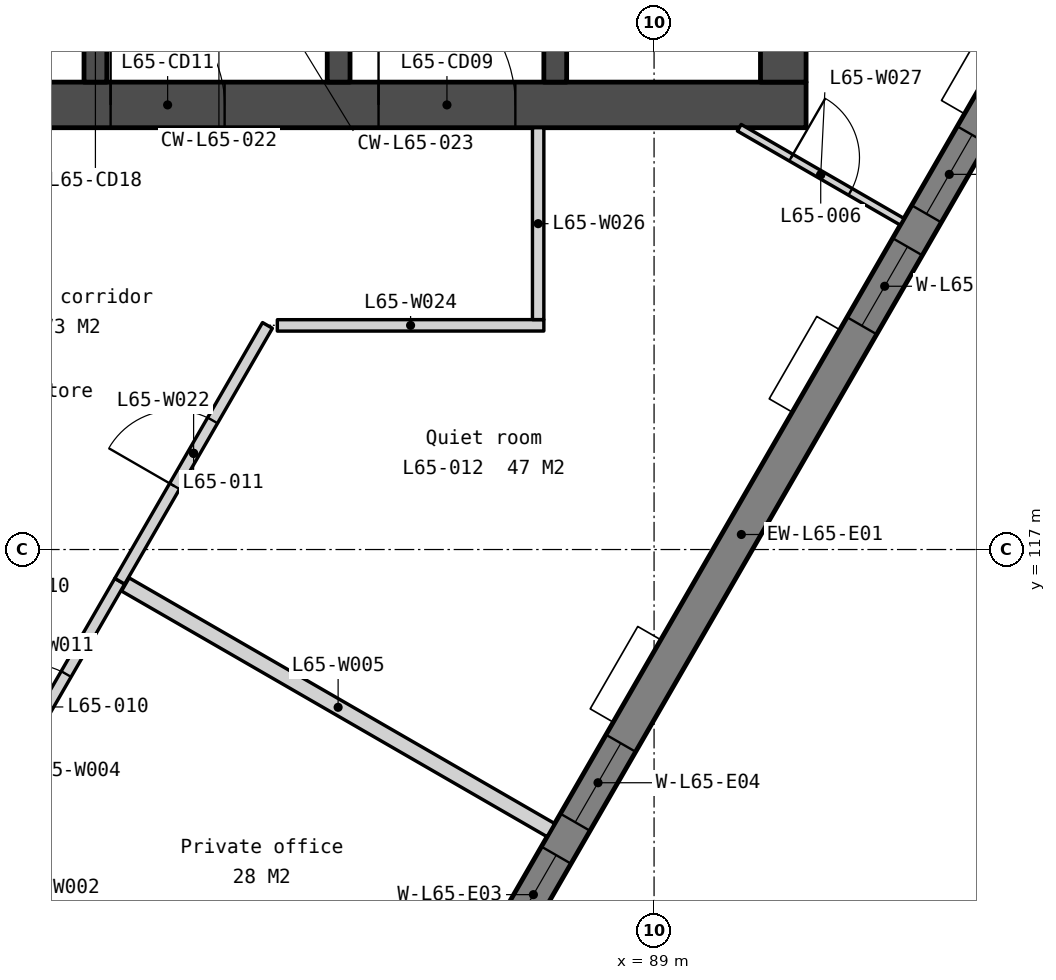
"""IFC4 building model, lengths in metres.
Left out: names, types, materials, properties, quantities, classifications, styles, units other than length and angle.
Written with IfcOpenShell. Run it as: python <this file> out.ifc"""

import sys

from ifc_helpers import new_model, si_unit, direction, frame, frame_2d, origin, place, context, subcontext, project, spatial, polyline, rectangle, outline, extrude, element, fill, save


model = new_model("IFC4")
c1 = context("Model", 3, precision=1e-05, world=origin(), true_north=direction((0.0, 1.0)))
c2 = subcontext(c1, "Body", "Model", "MODEL_VIEW")
j1 = project(units=[si_unit("LENGTHUNIT", "METRE"), si_unit("PLANEANGLEUNIT", "RADIAN")], contexts=[c1])
p1 = place(None, origin())
s1 = spatial("IfcSite", under=j1, at=p1, CompositionType="ELEMENT")
p2 = place(p1, origin())
s2 = spatial("IfcBuilding", under=s1, at=p2, CompositionType="ELEMENT")
p3 = place(p2, frame((0.0, 0.0, 266.0)))
s3 = spatial("IfcBuildingStorey", under=s2, at=p3, CompositionType="ELEMENT", Elevation=266.0)
p4 = place(p3, frame((69.0, 122.85, 0.0), z_axis=(0.0, 0.0, 1.0), x_axis=(1.0, 0.0, 0.0)))
e1 = element("IfcWall", 1, at=p4, inside=s3, PredefinedType="SOLIDWALL", context=c2, shape_type="SweptSolid", body=[
    extrude(rectangle(XDim=22.0, YDim=0.6, at=frame_2d((11.0, 0.0))), origin(), (0.0, 0.0, 1.0), 3.75),
])
p5 = place(p4, frame((16.375, 0.0, 0.0)))
e2 = element("IfcOpeningElement", 2, at=p5, cuts=e1, PredefinedType="OPENING", context=c2, shape_type="SweptSolid", body=[
    extrude(rectangle(XDim=1.8, YDim=2.1, at=frame_2d((0.9, 1.05))), frame((0.0, 0.31, 0.0), z_axis=(0.0, -1.0, 0.0), x_axis=(1.0, 0.0, 0.0)), (0.0, 0.0, 1.0), 0.62),
])
p6 = place(p4, frame((3.825, 0.0, 0.0)))
e3 = element("IfcOpeningElement", 3, at=p6, cuts=e1, PredefinedType="OPENING", context=c2, shape_type="SweptSolid", body=[
    extrude(rectangle(XDim=1.8, YDim=2.1, at=frame_2d((0.9, 1.05))), frame((0.0, 0.31, 0.0), z_axis=(0.0, -1.0, 0.0), x_axis=(1.0, 0.0, 0.0)), (0.0, 0.0, 1.0), 0.62),
])
p7 = place(p4, frame((12.85, 0.0, 0.0)))
e4 = element("IfcOpeningElement", 4, at=p7, cuts=e1, PredefinedType="OPENING", context=c2, shape_type="SweptSolid", body=[
    extrude(rectangle(XDim=1.5, YDim=2.1, at=frame_2d((0.75, 1.05))), frame((0.0, 0.31, 0.0), z_axis=(0.0, -1.0, 0.0), x_axis=(1.0, 0.0, 0.0)), (0.0, 0.0, 1.0), 0.62),
])
p8 = place(p3, frame((81.65, 125.7, 0.0), z_axis=(0.0, 0.0, 1.0), x_axis=(0.0, -1.0, 0.0)))
e5 = element("IfcWall", 5, at=p8, inside=s3, PredefinedType="SOLIDWALL", context=c2, shape_type="SweptSolid", body=[
    extrude(rectangle(XDim=2.55, YDim=0.3, at=frame_2d((1.275, 0.0))), origin(), (0.0, 0.0, 1.0), 3.75),
])
p9 = place(p8, frame((0.75, 0.0, 0.0)))
e6 = element("IfcOpeningElement", 6, at=p9, cuts=e5, PredefinedType="OPENING", context=c2, shape_type="SweptSolid", body=[
    extrude(rectangle(XDim=1.0, YDim=2.1, at=frame_2d((0.5, 1.05))), frame((0.0, 0.16, 0.0), z_axis=(0.0, -1.0, 0.0), x_axis=(1.0, 0.0, 0.0)), (0.0, 0.0, 1.0), 0.32),
])
p10 = place(p3, frame((84.85, 125.85, 0.0), z_axis=(0.0, 0.0, 1.0), x_axis=(0.0, -1.0, 0.0)))
e7 = element("IfcWall", 7, at=p10, inside=s3, PredefinedType="SOLIDWALL", context=c2, shape_type="SweptSolid", body=[
    extrude(rectangle(XDim=2.7, YDim=0.3, at=frame_2d((1.35, 0.0))), origin(), (0.0, 0.0, 1.0), 3.75),
])
p11 = place(p3, frame((87.7, 133.95, 0.0), z_axis=(0.0, 0.0, 1.0), x_axis=(0.0, -1.0, 0.0)))
e8 = element("IfcWall", 8, at=p11, inside=s3, PredefinedType="SOLIDWALL", context=c2, shape_type="SweptSolid", body=[
    extrude(rectangle(XDim=10.8, YDim=0.3, at=frame_2d((5.4, 0.0))), origin(), (0.0, 0.0, 1.0), 3.75),
])
p12 = place(p11, frame((6.95, 0.0, 0.0)))
e9 = element("IfcOpeningElement", 9, at=p12, cuts=e8, PredefinedType="OPENING", context=c2, shape_type="SweptSolid", body=[
    extrude(rectangle(XDim=1.1, YDim=2.1, at=frame_2d((0.55, 1.05))), frame((0.0, 0.16, 0.0), z_axis=(0.0, -1.0, 0.0), x_axis=(1.0, 0.0, 0.0)), (0.0, 0.0, 1.0), 0.32),
])
p13 = place(p11, frame((5.1, 0.0, 0.0)))
e10 = element("IfcOpeningElement", 10, at=p13, cuts=e8, PredefinedType="OPENING", context=c2, shape_type="SweptSolid", body=[
    extrude(rectangle(XDim=1.0, YDim=2.1, at=frame_2d((0.5, 1.05))), frame((0.0, 0.16, 0.0), z_axis=(0.0, -1.0, 0.0), x_axis=(1.0, 0.0, 0.0)), (0.0, 0.0, 1.0), 0.32),
])
p14 = place(p11, frame((9.25, 0.0, 0.0)))
e11 = element("IfcOpeningElement", 11, at=p14, cuts=e8, PredefinedType="OPENING", context=c2, shape_type="SweptSolid", body=[
    extrude(rectangle(XDim=1.1, YDim=2.1, at=frame_2d((0.55, 1.05))), frame((0.0, 0.16, 0.0), z_axis=(0.0, -1.0, 0.0), x_axis=(1.0, 0.0, 0.0)), (0.0, 0.0, 1.0), 0.32),
])
p15 = place(p3, frame((90.7, 133.95, 0.0), z_axis=(0.0, 0.0, 1.0), x_axis=(0.0, -1.0, 0.0)))
e12 = element("IfcWall", 12, at=p15, inside=s3, PredefinedType="SOLIDWALL", context=c2, shape_type="SweptSolid", body=[
    extrude(rectangle(XDim=10.8, YDim=0.6, at=frame_2d((5.4, 0.0))), origin(), (0.0, 0.0, 1.0), 3.75),
])
p16 = place(p3, frame((80.905, 101.188, -0.15), z_axis=(0.0, 0.0, 1.0), x_axis=(0.500002536638, 0.866023939251, 0.0)))
e13 = element("IfcWall", 13, at=p16, inside=s3, PredefinedType="SOLIDWALL", context=c2, shape_type="SweptSolid", body=[
    extrude(outline(polyline([(36.972, 0.0), (36.972, 3.9), (0.0, 3.9), (0.0, 0.0), (36.972, 0.0)])), frame((0.0, 0.225, 0.0), z_axis=(0.0, -1.0, 0.0), x_axis=(1.0, 0.0, 0.0)), (0.0, 0.0, 1.0), 0.45),
])
p17 = place(p16, frame((3.172, 0.0, 0.95)))
e14 = element("IfcOpeningElement", 14, at=p17, cuts=e13, PredefinedType="OPENING", context=c2, shape_type="SweptSolid", body=[
    extrude(rectangle(XDim=1.2, YDim=2.2, at=frame_2d((0.6, 1.1))), frame((0.0, 0.235, 0.0), z_axis=(0.0, -1.0, 0.0), x_axis=(1.0, 0.0, 0.0)), (0.0, 0.0, 1.0), 0.47),
])
p18 = place(p16, frame((4.872, 0.0, 0.95)))
e15 = element("IfcOpeningElement", 15, at=p18, cuts=e13, PredefinedType="OPENING", context=c2, shape_type="SweptSolid", body=[
    extrude(rectangle(XDim=1.2, YDim=2.2, at=frame_2d((0.6, 1.1))), frame((0.0, 0.235, 0.0), z_axis=(0.0, -1.0, 0.0), x_axis=(1.0, 0.0, 0.0)), (0.0, 0.0, 1.0), 0.47),
])
p19 = place(p16, frame((12.415, 0.0, 0.95)))
e16 = element("IfcOpeningElement", 16, at=p19, cuts=e13, PredefinedType="OPENING", context=c2, shape_type="SweptSolid", body=[
    extrude(rectangle(XDim=1.2, YDim=2.2, at=frame_2d((0.6, 1.1))), frame((0.0, 0.235, 0.0), z_axis=(0.0, -1.0, 0.0), x_axis=(1.0, 0.0, 0.0)), (0.0, 0.0, 1.0), 0.47),
])
p20 = place(p16, frame((14.115, 0.0, 0.95)))
e17 = element("IfcOpeningElement", 17, at=p20, cuts=e13, PredefinedType="OPENING", context=c2, shape_type="SweptSolid", body=[
    extrude(rectangle(XDim=1.2, YDim=2.2, at=frame_2d((0.6, 1.1))), frame((0.0, 0.235, 0.0), z_axis=(0.0, -1.0, 0.0), x_axis=(1.0, 0.0, 0.0)), (0.0, 0.0, 1.0), 0.47),
])
p21 = place(p16, frame((21.658, 0.0, 0.95)))
e18 = element("IfcOpeningElement", 18, at=p21, cuts=e13, PredefinedType="OPENING", context=c2, shape_type="SweptSolid", body=[
    extrude(rectangle(XDim=1.2, YDim=2.2, at=frame_2d((0.6, 1.1))), frame((0.0, 0.235, 0.0), z_axis=(0.0, -1.0, 0.0), x_axis=(1.0, 0.0, 0.0)), (0.0, 0.0, 1.0), 0.47),
])
p22 = place(p16, frame((23.358, 0.0, 0.95)))
e19 = element("IfcOpeningElement", 19, at=p22, cuts=e13, PredefinedType="OPENING", context=c2, shape_type="SweptSolid", body=[
    extrude(rectangle(XDim=1.2, YDim=2.2, at=frame_2d((0.6, 1.1))), frame((0.0, 0.235, 0.0), z_axis=(0.0, -1.0, 0.0), x_axis=(1.0, 0.0, 0.0)), (0.0, 0.0, 1.0), 0.47),
])
p23 = place(p16, frame((30.901, 0.0, 0.95)))
e20 = element("IfcOpeningElement", 20, at=p23, cuts=e13, PredefinedType="OPENING", context=c2, shape_type="SweptSolid", body=[
    extrude(rectangle(XDim=1.2, YDim=2.2, at=frame_2d((0.6, 1.1))), frame((0.0, 0.235, 0.0), z_axis=(0.0, -1.0, 0.0), x_axis=(1.0, 0.0, 0.0)), (0.0, 0.0, 1.0), 0.47),
])
p24 = place(p16, frame((32.601, 0.0, 0.95)))
e21 = element("IfcOpeningElement", 21, at=p24, cuts=e13, PredefinedType="OPENING", context=c2, shape_type="SweptSolid", body=[
    extrude(rectangle(XDim=1.2, YDim=2.2, at=frame_2d((0.6, 1.1))), frame((0.0, 0.235, 0.0), z_axis=(0.0, -1.0, 0.0), x_axis=(1.0, 0.0, 0.0)), (0.0, 0.0, 1.0), 0.47),
])
p25 = place(p3, frame((80.0, 112.384, 0.0), z_axis=(0.0, 0.0, 1.0), x_axis=(0.866021154418, -0.500007360046, 0.0)))
e22 = element("IfcWall", 22, at=p25, inside=s3, PredefinedType="PARTITIONING", context=c2, shape_type="SweptSolid", body=[
    extrude(rectangle(XDim=6.157, YDim=0.2, at=frame_2d((3.078, 0.0))), origin(), (0.0, 0.0, 1.0), 3.75),
])
p26 = place(p3, frame((82.044, 116.54, 0.0), z_axis=(0.0, 0.0, 1.0), x_axis=(0.86603151488, -0.499989415123, 0.0)))
e23 = element("IfcWall", 23, at=p26, inside=s3, PredefinedType="PARTITIONING", context=c2, shape_type="SweptSolid", body=[
    extrude(rectangle(XDim=6.465, YDim=0.2, at=frame_2d((3.232, 0.0))), origin(), (0.0, 0.0, 1.0), 3.75),
])
p27 = place(p3, frame((80.06, 113.274, 0.0), z_axis=(0.0, 0.0, 1.0), x_axis=(0.499987977232, 0.866032345022, 0.0)))
e24 = element("IfcWall", 24, at=p27, inside=s3, PredefinedType="PARTITIONING", context=c2, shape_type="SweptSolid", body=[
    extrude(rectangle(XDim=3.82, YDim=0.15, at=frame_2d((1.91, 0.0))), origin(), (0.0, 0.0, 1.0), 3.75),
])
p28 = place(p27, frame((1.41, 0.0, 0.0)))
e25 = element("IfcOpeningElement", 25, at=p28, cuts=e24, PredefinedType="OPENING", context=c2, shape_type="SweptSolid", body=[
    extrude(rectangle(XDim=1.0, YDim=2.1, at=frame_2d((0.5, 1.05))), frame((0.0, 0.085, 0.0), z_axis=(0.0, -1.0, 0.0), x_axis=(1.0, 0.0, 0.0)), (0.0, 0.0, 1.0), 0.17),
])
p29 = place(p3, frame((81.97, 116.583, 0.0), z_axis=(0.0, 0.0, 1.0), x_axis=(0.500003384379, 0.866023449803, 0.0)))
e26 = element("IfcWall", 26, at=p29, inside=s3, PredefinedType="PARTITIONING", context=c2, shape_type="SweptSolid", body=[
    extrude(rectangle(XDim=3.887, YDim=0.15, at=frame_2d((1.943, 0.0))), origin(), (0.0, 0.0, 1.0), 3.75),
])
p30 = place(p29, frame((1.443, 0.0, 0.0)))
e27 = element("IfcOpeningElement", 27, at=p30, cuts=e26, PredefinedType="OPENING", context=c2, shape_type="SweptSolid", body=[
    extrude(rectangle(XDim=1.0, YDim=2.1, at=frame_2d((0.5, 1.05))), frame((0.0, 0.085, 0.0), z_axis=(0.0, -1.0, 0.0), x_axis=(1.0, 0.0, 0.0)), (0.0, 0.0, 1.0), 0.17),
])
p31 = place(p3, frame((84.043, 119.949, 0.0), z_axis=(0.0, 0.0, 1.0), x_axis=(0.999999961215, 0.000278512731, 0.0)))
e28 = element("IfcWall", 28, at=p31, inside=s3, PredefinedType="PARTITIONING", context=c2, shape_type="SweptSolid", body=[
    extrude(rectangle(XDim=3.506, YDim=0.15, at=frame_2d((1.753, 0.0))), origin(), (0.0, 0.0, 1.0), 3.75),
])
p32 = place(p3, frame((87.475, 120.025, 0.0), z_axis=(0.0, 0.0, 1.0), x_axis=(9.6693096e-05, 0.999999995325, 0.0)))
e29 = element("IfcWall", 29, at=p32, inside=s3, PredefinedType="PARTITIONING", context=c2, shape_type="SweptSolid", body=[
    extrude(rectangle(XDim=2.525, YDim=0.15, at=frame_2d((1.262, 0.0))), origin(), (0.0, 0.0, 1.0), 3.75),
])
p33 = place(p3, frame((90.121, 122.55, 0.0), z_axis=(0.0, 0.0, 1.0), x_axis=(0.86604923931, -0.499958713387, 0.0)))
e30 = element("IfcWall", 30, at=p33, inside=s3, PredefinedType="PARTITIONING", context=c2, shape_type="SweptSolid", body=[
    extrude(rectangle(XDim=2.475, YDim=0.1, at=frame_2d((1.237, 0.0))), origin(), (0.0, 0.0, 1.0), 3.75),
])
p34 = place(p33, frame((0.787, 0.0, 0.0)))
e31 = element("IfcOpeningElement", 31, at=p34, cuts=e30, PredefinedType="OPENING", context=c2, shape_type="SweptSolid", body=[
    extrude(rectangle(XDim=0.9, YDim=2.1, at=frame_2d((0.45, 1.05))), frame((0.0, 0.06, 0.0), z_axis=(0.0, -1.0, 0.0), x_axis=(1.0, 0.0, 0.0)), (0.0, 0.0, 1.0), 0.12),
])
p35 = place(p5, origin())
e32 = element("IfcDoor", 32, at=p35, inside=s3, OperationType="DOUBLE_DOOR_DOUBLE_SWING", PredefinedType="DOOR", context=c2, shape_type="SweptSolid", body=[
    extrude(rectangle(XDim=1.8, YDim=2.1, at=frame_2d((0.9, 1.05))), frame((0.0, 0.025, 0.0), z_axis=(0.0, -1.0, 0.0), x_axis=(1.0, 0.0, 0.0)), (0.0, 0.0, 1.0), 0.05),
])
fill(e2, e32)
p36 = place(p7, origin())
e33 = element("IfcDoor", 33, at=p36, inside=s3, OperationType="DOUBLE_DOOR_DOUBLE_SWING", PredefinedType="DOOR", context=c2, shape_type="SweptSolid", body=[
    extrude(rectangle(XDim=1.5, YDim=2.1, at=frame_2d((0.75, 1.05))), frame((0.0, 0.025, 0.0), z_axis=(0.0, -1.0, 0.0), x_axis=(1.0, 0.0, 0.0)), (0.0, 0.0, 1.0), 0.05),
])
fill(e4, e33)
p37 = place(p19, origin())
e34 = element("IfcWindow", 34, at=p37, inside=s3, PartitioningType="SINGLE_PANEL", PredefinedType="WINDOW", context=c2, shape_type="SweptSolid", body=[
    extrude(rectangle(XDim=1.2, YDim=2.2, at=frame_2d((0.6, 1.1))), frame((0.0, 0.03, 0.0), z_axis=(0.0, -1.0, 0.0), x_axis=(1.0, 0.0, 0.0)), (0.0, 0.0, 1.0), 0.06),
])
fill(e16, e34)
p38 = place(p20, origin())
e35 = element("IfcWindow", 35, at=p38, inside=s3, PartitioningType="SINGLE_PANEL", PredefinedType="WINDOW", context=c2, shape_type="SweptSolid", body=[
    extrude(rectangle(XDim=1.2, YDim=2.2, at=frame_2d((0.6, 1.1))), frame((0.0, 0.03, 0.0), z_axis=(0.0, -1.0, 0.0), x_axis=(1.0, 0.0, 0.0)), (0.0, 0.0, 1.0), 0.06),
])
fill(e17, e35)
p39 = place(p21, origin())
e36 = element("IfcWindow", 36, at=p39, inside=s3, PartitioningType="SINGLE_PANEL", PredefinedType="WINDOW", context=c2, shape_type="SweptSolid", body=[
    extrude(rectangle(XDim=1.2, YDim=2.2, at=frame_2d((0.6, 1.1))), frame((0.0, 0.03, 0.0), z_axis=(0.0, -1.0, 0.0), x_axis=(1.0, 0.0, 0.0)), (0.0, 0.0, 1.0), 0.06),
])
fill(e18, e36)
p40 = place(p22, origin())
e37 = element("IfcWindow", 37, at=p40, inside=s3, PartitioningType="SINGLE_PANEL", PredefinedType="WINDOW", context=c2, shape_type="SweptSolid", body=[
    extrude(rectangle(XDim=1.2, YDim=2.2, at=frame_2d((0.6, 1.1))), frame((0.0, 0.03, 0.0), z_axis=(0.0, -1.0, 0.0), x_axis=(1.0, 0.0, 0.0)), (0.0, 0.0, 1.0), 0.06),
])
fill(e19, e37)
p41 = place(p34, origin())
e38 = element("IfcDoor", 38, at=p41, inside=s3, OperationType="SINGLE_SWING_LEFT", PredefinedType="DOOR", context=c2, shape_type="SweptSolid", body=[
    extrude(rectangle(XDim=0.9, YDim=2.1, at=frame_2d((0.45, 1.05))), frame((0.0, 0.025, 0.0), z_axis=(0.0, -1.0, 0.0), x_axis=(1.0, 0.0, 0.0)), (0.0, 0.0, 1.0), 0.05),
])
fill(e31, e38)
p42 = place(p28, origin())
e39 = element("IfcDoor", 39, at=p42, inside=s3, OperationType="SINGLE_SWING_LEFT", PredefinedType="DOOR", context=c2, shape_type="SweptSolid", body=[
    extrude(rectangle(XDim=1.0, YDim=2.1, at=frame_2d((0.5, 1.05))), frame((0.0, 0.025, 0.0), z_axis=(0.0, -1.0, 0.0), x_axis=(1.0, 0.0, 0.0)), (0.0, 0.0, 1.0), 0.05),
])
fill(e25, e39)
p43 = place(p30, origin())
e40 = element("IfcDoor", 40, at=p43, inside=s3, OperationType="SINGLE_SWING_LEFT", PredefinedType="DOOR", context=c2, shape_type="SweptSolid", body=[
    extrude(rectangle(XDim=1.0, YDim=2.1, at=frame_2d((0.5, 1.05))), frame((0.0, 0.025, 0.0), z_axis=(0.0, -1.0, 0.0), x_axis=(1.0, 0.0, 0.0)), (0.0, 0.0, 1.0), 0.05),
])
fill(e27, e40)
save(model, sys.argv[1])
